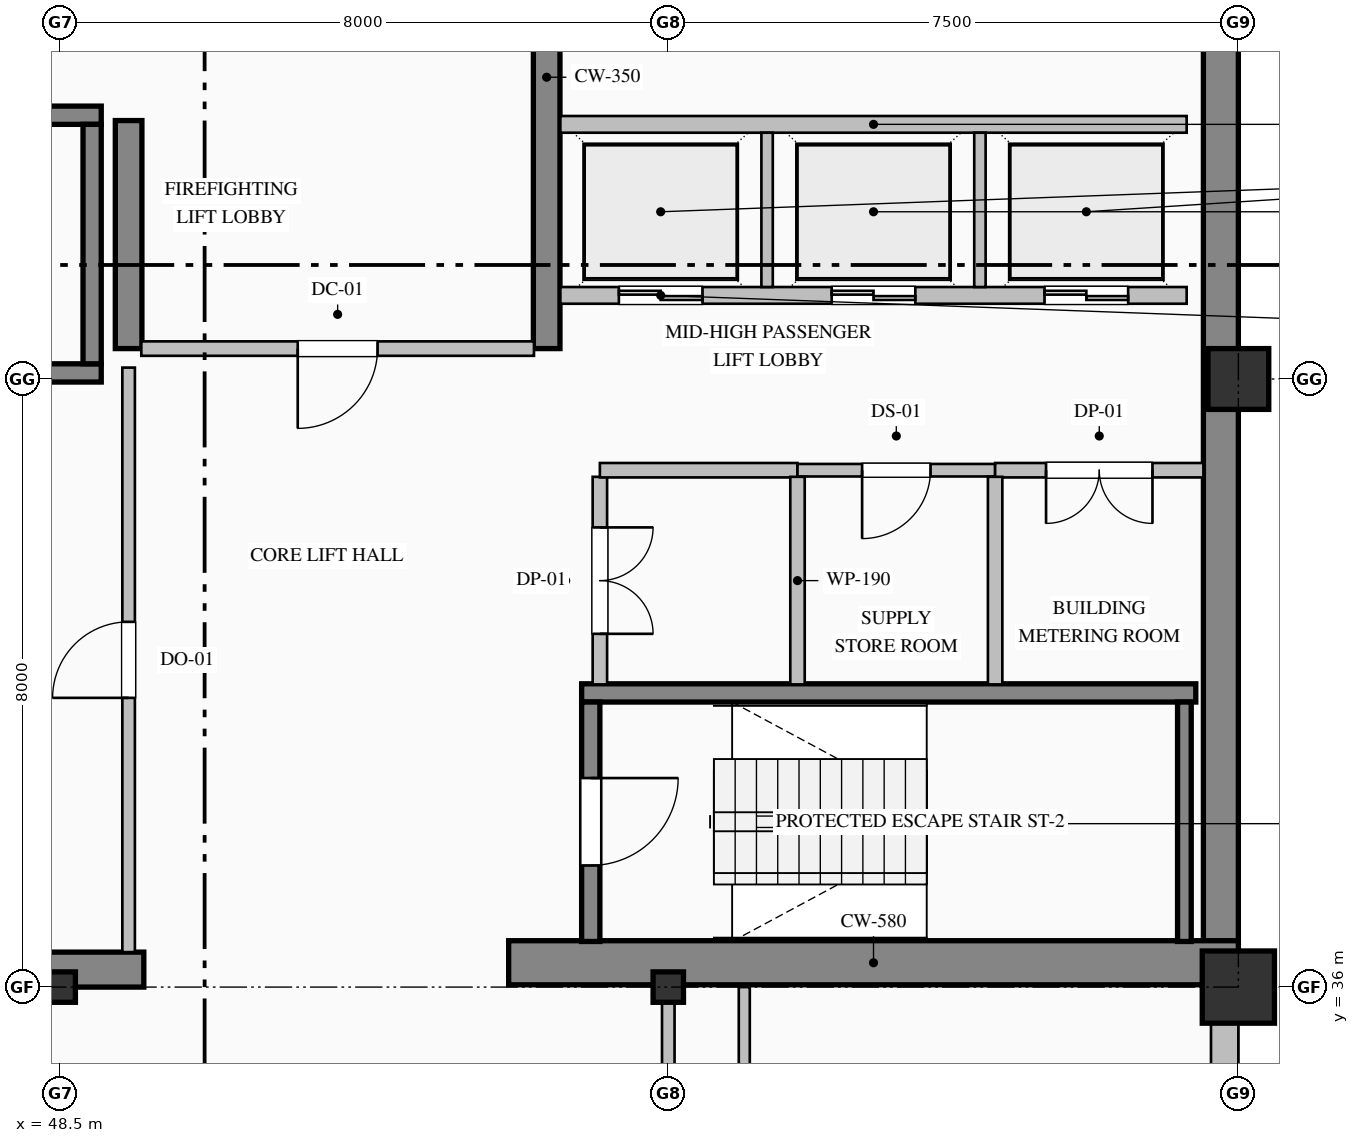
"""IFC4 building model, lengths in metres.
Left out: names, types, materials, properties, quantities, classifications, styles, units other than length and angle.
Written with IfcOpenShell. Run it as: python <this file> out.ifc"""

import sys

from ifc_helpers import new_model, si_unit, direction, frame, frame_2d, origin, origin_2d, place, context, subcontext, project, spatial, rectangle, hollow_rectangle, i_section, extrude, element, fill, save


model = new_model("IFC4")
c1 = context("Model", 3, precision=1e-05, world=origin(), true_north=direction((0.0, 1.0)))
c2 = subcontext(c1, "Body", "Model", "MODEL_VIEW")
j1 = project(units=[si_unit("LENGTHUNIT", "METRE"), si_unit("PLANEANGLEUNIT", "RADIAN")], contexts=[c1])
p1 = place(None, origin())
s1 = spatial("IfcSite", under=j1, at=p1, CompositionType="ELEMENT")
p2 = place(p1, origin())
s2 = spatial("IfcBuilding", under=s1, at=p2, CompositionType="ELEMENT")
p3 = place(p2, frame((0.0, 0.0, 241.8)))
s3 = spatial("IfcBuildingStorey", under=s2, at=p3, CompositionType="ELEMENT", Elevation=241.8)
p4 = place(p3, frame((63.77, 36.32, 0.0), z_axis=(0.0, 0.0, 1.0), x_axis=(0.0, 1.0, 0.0)))
e1 = element("IfcWall", 1, at=p4, inside=s3, PredefinedType="SHEAR", context=c2, shape_type="SweptSolid", body=[
    extrude(rectangle(XDim=15.22, YDim=0.46, at=frame_2d((7.61, 0.0))), origin(), (0.0, 0.0, 1.0), 3.775),
])
p5 = place(p3, frame((40.5, 36.23, 0.0), z_axis=(0.0, 0.0, 1.0), x_axis=(1.0, 0.0, 0.0)))
e2 = element("IfcWall", 2, at=p5, inside=s3, PredefinedType="SHEAR", context=c2, shape_type="SweptSolid", body=[
    extrude(rectangle(XDim=9.1, YDim=0.46, at=frame_2d((4.55, 0.0))), origin(), (0.0, 0.0, 1.0), 3.775),
])
p6 = place(p3, frame((54.4, 36.32, 0.0), z_axis=(0.0, 0.0, 1.0), x_axis=(1.0, 0.0, 0.0)))
e3 = element("IfcWall", 3, at=p6, inside=s3, PredefinedType="SHEAR", context=c2, shape_type="SweptSolid", body=[
    extrude(rectangle(XDim=9.6, YDim=0.58, at=frame_2d((4.8, 0.0))), origin(), (0.0, 0.0, 1.0), 4.0),
])
p7 = place(p3, frame((49.4, 44.4, 0.0), z_axis=(0.0, 0.0, 1.0), x_axis=(0.0, 1.0, 0.0)))
e4 = element("IfcWall", 4, at=p7, inside=s3, PredefinedType="SHEAR", context=c2, shape_type="SweptSolid", body=[
    extrude(rectangle(XDim=3.0, YDim=0.35, at=frame_2d((1.5, 0.0))), origin(), (0.0, 0.0, 1.0), 3.775),
])
p8 = place(p3, frame((54.9, 44.4, 0.0), z_axis=(0.0, 0.0, 1.0), x_axis=(0.0, 1.0, 0.0)))
e5 = element("IfcWall", 5, at=p8, inside=s3, PredefinedType="SHEAR", context=c2, shape_type="SweptSolid", body=[
    extrude(rectangle(XDim=7.14, YDim=0.35, at=frame_2d((3.57, 0.0))), origin(), (0.0, 0.0, 1.0), 3.775),
])
for number, where, z_axis, x_axis in (
    (6, (48.5, 36.0, 0.0), (0.0, 0.0, 1.0), (1.0, 0.0, 0.0)),
    (7, (56.5, 36.0, 0.0), (0.0, 0.0, 1.0), (1.0, 0.0, 0.0)),
):
    element("IfcColumn", number, at=place(p3, frame(where, z_axis=z_axis, x_axis=x_axis)), inside=s3, PredefinedType="COLUMN", context=c2, shape_type="SweptSolid", body=[
        extrude(i_section(OverallWidth=0.4, OverallDepth=0.4, WebThickness=0.013, FlangeThickness=0.021, FilletRadius=0.022, at=origin_2d()), origin(), (0.0, 0.0, 1.0), 4.0),
    ])
p9 = place(p3, frame((64.0, 36.0, 0.0), z_axis=(0.0, 0.0, 1.0), x_axis=(1.0, 0.0, 0.0)))
e8 = element("IfcColumn", 8, at=p9, inside=s3, PredefinedType="COLUMN", context=c2, shape_type="SweptSolid", body=[
    extrude(hollow_rectangle(XDim=0.95, YDim=0.95, WallThickness=0.036, at=origin_2d()), origin(), (0.0, 0.0, 1.0), 4.0),
])
p10 = place(p3, frame((64.0, 44.0, 0.0), z_axis=(0.0, 0.0, 1.0), x_axis=(1.0, 0.0, 0.0)))
e9 = element("IfcColumn", 9, at=p10, inside=s3, PredefinedType="COLUMN", context=c2, shape_type="SweptSolid", body=[
    extrude(hollow_rectangle(XDim=0.8, YDim=0.8, WallThickness=0.032, at=origin_2d()), origin(), (0.0, 0.0, 1.0), 4.0),
])
p11 = place(p3, frame((63.82, 36.05, 0.0), z_axis=(0.0, 0.0, 1.0), x_axis=(0.0, -1.0, 0.0)))
e10 = element("IfcWall", 10, at=p11, inside=s3, PredefinedType="SOLIDWALL", context=c2, shape_type="SweptSolid", body=[
    extrude(rectangle(XDim=19.55, YDim=0.36, at=frame_2d((9.775, 0.0))), origin(), (0.0, 0.0, 1.0), 3.325),
])
p12 = place(p11, frame((2.925, 0.0, 0.9)))
e11 = element("IfcOpeningElement", 11, at=p12, cuts=e10, PredefinedType="OPENING", context=c2, shape_type="SweptSolid", body=[
    extrude(rectangle(XDim=1.35, YDim=1.85, at=frame_2d((0.675, 0.925))), frame((0.0, 0.19, 0.0), z_axis=(0.0, -1.0, 0.0), x_axis=(1.0, 0.0, 0.0)), (0.0, 0.0, 1.0), 0.38),
])
p13 = place(p11, frame((10.2, 0.0, 0.9)))
e12 = element("IfcOpeningElement", 12, at=p13, cuts=e10, PredefinedType="OPENING", context=c2, shape_type="SweptSolid", body=[
    extrude(rectangle(XDim=1.2, YDim=1.85, at=frame_2d((0.6, 0.925))), frame((0.0, 0.19, 0.0), z_axis=(0.0, -1.0, 0.0), x_axis=(1.0, 0.0, 0.0)), (0.0, 0.0, 1.0), 0.38),
])
p14 = place(p11, frame((13.725, 0.0, 0.9)))
e13 = element("IfcOpeningElement", 13, at=p14, cuts=e10, PredefinedType="OPENING", context=c2, shape_type="SweptSolid", body=[
    extrude(rectangle(XDim=1.35, YDim=1.85, at=frame_2d((0.675, 0.925))), frame((0.0, 0.19, 0.0), z_axis=(0.0, -1.0, 0.0), x_axis=(1.0, 0.0, 0.0)), (0.0, 0.0, 1.0), 0.38),
])
for number, where, z_axis, x_axis in (
    (14, (40.96, 47.47, 0.0), (0.0, 0.0, 1.0), (1.0, 0.0, 0.0)),
    (15, (49.04, 44.08, 0.0), (0.0, 0.0, 1.0), (-1.0, 0.0, 0.0)),
):
    element("IfcWall", number, at=place(p3, frame(where, z_axis=z_axis, x_axis=x_axis)), inside=s3, PredefinedType="SOLIDWALL", context=c2, shape_type="SweptSolid", body=[
        extrude(rectangle(XDim=8.08, YDim=0.24, at=frame_2d((4.04, 0.0))), origin(), (0.0, 0.0, 1.0), 4.0),
    ])
p15 = place(p3, frame((48.92, 44.2, 0.0), z_axis=(0.0, 0.0, 1.0), x_axis=(0.0, 1.0, 0.0)))
e16 = element("IfcWall", 16, at=p15, inside=s3, PredefinedType="SOLIDWALL", context=c2, shape_type="SweptSolid", body=[
    extrude(rectangle(XDim=3.15, YDim=0.24, at=frame_2d((1.575, 0.0))), origin(), (0.0, 0.0, 1.0), 4.0),
])
p16 = place(p3, frame((55.36, 39.87, 0.0), z_axis=(0.0, 0.0, 1.0), x_axis=(1.0, 0.0, 0.0)))
e17 = element("IfcWall", 17, at=p16, inside=s3, PredefinedType="SOLIDWALL", context=c2, shape_type="SweptSolid", body=[
    extrude(rectangle(XDim=8.08, YDim=0.24, at=frame_2d((4.04, 0.0))), origin(), (0.0, 0.0, 1.0), 4.0),
])
p17 = place(p3, frame((55.48, 39.75, 0.0), z_axis=(0.0, 0.0, 1.0), x_axis=(0.0, -1.0, 0.0)))
e18 = element("IfcWall", 18, at=p17, inside=s3, PredefinedType="SOLIDWALL", context=c2, shape_type="SweptSolid", body=[
    extrude(rectangle(XDim=3.15, YDim=0.24, at=frame_2d((1.575, 0.0))), origin(), (0.0, 0.0, 1.0), 4.0),
])
p18 = place(p17, frame((1.0, 0.0, 0.0)))
e19 = element("IfcOpeningElement", 19, at=p18, cuts=e18, PredefinedType="OPENING", context=c2, shape_type="SweptSolid", body=[
    extrude(rectangle(XDim=1.15, YDim=2.2, at=frame_2d((0.575, 1.1))), frame((0.0, 0.13, 0.0), z_axis=(0.0, -1.0, 0.0), x_axis=(1.0, 0.0, 0.0)), (0.0, 0.0, 1.0), 0.26),
])
p19 = place(p3, frame((63.29, 36.6, 0.0), z_axis=(0.0, 0.0, 1.0), x_axis=(0.0, 1.0, 0.0)))
e20 = element("IfcWall", 20, at=p19, inside=s3, PredefinedType="SOLIDWALL", context=c2, shape_type="SweptSolid", body=[
    extrude(rectangle(XDim=3.15, YDim=0.18, at=frame_2d((1.575, 0.0))), origin(), (0.0, 0.0, 1.0), 4.0),
])
p20 = place(p3, frame((63.32, 45.1, 0.0), z_axis=(0.0, 0.0, 1.0), x_axis=(-1.0, 0.0, 0.0)))
e21 = element("IfcWall", 21, at=p20, inside=s3, PredefinedType="PARTITIONING", context=c2, shape_type="SweptSolid", body=[
    extrude(rectangle(XDim=8.24, YDim=0.22, at=frame_2d((4.12, 0.0))), origin(), (0.0, 0.0, 1.0), 3.775),
])
p21 = place(p20, frame((6.37, 0.0, 0.0)))
e22 = element("IfcOpeningElement", 22, at=p21, cuts=e21, PredefinedType="OPENING", context=c2, shape_type="SweptSolid", body=[
    extrude(rectangle(XDim=1.1, YDim=2.2, at=frame_2d((0.55, 1.1))), frame((0.0, 0.12, 0.0), z_axis=(0.0, -1.0, 0.0), x_axis=(1.0, 0.0, 0.0)), (0.0, 0.0, 1.0), 0.24),
])
p22 = place(p20, frame((3.57, 0.0, 0.0)))
e23 = element("IfcOpeningElement", 23, at=p22, cuts=e21, PredefinedType="OPENING", context=c2, shape_type="SweptSolid", body=[
    extrude(rectangle(XDim=1.1, YDim=2.2, at=frame_2d((0.55, 1.1))), frame((0.0, 0.12, 0.0), z_axis=(0.0, -1.0, 0.0), x_axis=(1.0, 0.0, 0.0)), (0.0, 0.0, 1.0), 0.24),
])
p23 = place(p20, frame((0.77, 0.0, 0.0)))
e24 = element("IfcOpeningElement", 24, at=p23, cuts=e21, PredefinedType="OPENING", context=c2, shape_type="SweptSolid", body=[
    extrude(rectangle(XDim=1.1, YDim=2.2, at=frame_2d((0.55, 1.1))), frame((0.0, 0.12, 0.0), z_axis=(0.0, -1.0, 0.0), x_axis=(1.0, 0.0, 0.0)), (0.0, 0.0, 1.0), 0.24),
])
p24 = place(p3, frame((55.08, 47.35, 0.0), z_axis=(0.0, 0.0, 1.0), x_axis=(1.0, 0.0, 0.0)))
e25 = element("IfcWall", 25, at=p24, inside=s3, PredefinedType="PARTITIONING", context=c2, shape_type="SweptSolid", body=[
    extrude(rectangle(XDim=8.24, YDim=0.22, at=frame_2d((4.12, 0.0))), origin(), (0.0, 0.0, 1.0), 3.775),
])
for number, where, z_axis, x_axis in (
    (26, (57.8, 45.21, 0.0), (0.0, 0.0, 1.0), (0.0, 1.0, 0.0)),
    (27, (60.6, 45.21, 0.0), (0.0, 0.0, 1.0), (0.0, 1.0, 0.0)),
):
    element("IfcWall", number, at=place(p3, frame(where, z_axis=z_axis, x_axis=x_axis)), inside=s3, PredefinedType="PARTITIONING", context=c2, shape_type="SweptSolid", body=[
        extrude(rectangle(XDim=2.03, YDim=0.15, at=frame_2d((1.015, 0.0))), origin(), (0.0, 0.0, 1.0), 3.775),
    ])
p25 = place(p3, frame((54.733, 44.4, 0.0), z_axis=(0.0, 0.0, 1.0), x_axis=(-1.0, 0.0, 0.0)))
e28 = element("IfcWall", 28, at=p25, inside=s3, PredefinedType="PARTITIONING", context=c2, shape_type="SweptSolid", body=[
    extrude(rectangle(XDim=5.166, YDim=0.19, at=frame_2d((2.583, 0.0))), origin(), (0.0, 0.0, 1.0), 3.775),
])
p26 = place(p25, frame((2.058, 0.0, 0.0)))
e29 = element("IfcOpeningElement", 29, at=p26, cuts=e28, PredefinedType="OPENING", context=c2, shape_type="SweptSolid", body=[
    extrude(rectangle(XDim=1.05, YDim=2.15, at=frame_2d((0.525, 1.075))), frame((0.0, 0.105, 0.0), z_axis=(0.0, -1.0, 0.0), x_axis=(1.0, 0.0, 0.0)), (0.0, 0.0, 1.0), 0.21),
])
p27 = place(p3, frame((49.4, 36.46, 0.0), z_axis=(0.0, 0.0, 1.0), x_axis=(0.0, 1.0, 0.0)))
e30 = element("IfcWall", 30, at=p27, inside=s3, PredefinedType="PARTITIONING", context=c2, shape_type="SweptSolid", body=[
    extrude(rectangle(XDim=7.69, YDim=0.165, at=frame_2d((3.845, 0.0))), origin(), (0.0, 0.0, 1.0), 3.017),
])
p28 = place(p27, frame((3.345, 0.0, 0.0)))
e31 = element("IfcOpeningElement", 31, at=p28, cuts=e30, PredefinedType="OPENING", context=c2, shape_type="SweptSolid", body=[
    extrude(rectangle(XDim=1.0, YDim=2.15, at=frame_2d((0.5, 1.075))), frame((0.0, 0.093, 0.0), z_axis=(0.0, -1.0, 0.0), x_axis=(1.0, 0.0, 0.0)), (0.0, 0.0, 1.0), 0.185),
])
p29 = place(p3, frame((55.6, 42.713, 0.0), z_axis=(0.0, 0.0, 1.0), x_axis=(0.0, -1.0, 0.0)))
e32 = element("IfcWall", 32, at=p29, inside=s3, PredefinedType="PARTITIONING", context=c2, shape_type="SweptSolid", body=[
    extrude(rectangle(XDim=2.731, YDim=0.19, at=frame_2d((1.365, 0.0))), origin(), (0.0, 0.0, 1.0), 3.775),
])
p30 = place(p29, frame((0.666, 0.0, 0.0)))
e33 = element("IfcOpeningElement", 33, at=p30, cuts=e32, PredefinedType="OPENING", context=c2, shape_type="SweptSolid", body=[
    extrude(rectangle(XDim=1.4, YDim=2.25, at=frame_2d((0.7, 1.125))), frame((0.0, 0.105, 0.0), z_axis=(0.0, -1.0, 0.0), x_axis=(1.0, 0.0, 0.0)), (0.0, 0.0, 1.0), 0.21),
])
p31 = place(p3, frame((58.2, 42.8, 0.0), z_axis=(0.0, 0.0, 1.0), x_axis=(-1.0, 0.0, 0.0)))
e34 = element("IfcWall", 34, at=p31, inside=s3, PredefinedType="PARTITIONING", context=c2, shape_type="SweptSolid", body=[
    extrude(rectangle(XDim=2.6, YDim=0.19, at=frame_2d((1.3, 0.0))), origin(), (0.0, 0.0, 1.0), 3.775),
])
p32 = place(p3, frame((60.8, 42.8, 0.0), z_axis=(0.0, 0.0, 1.0), x_axis=(-1.0, 0.0, 0.0)))
e35 = element("IfcWall", 35, at=p32, inside=s3, PredefinedType="PARTITIONING", context=c2, shape_type="SweptSolid", body=[
    extrude(rectangle(XDim=2.6, YDim=0.165, at=frame_2d((1.3, 0.0))), origin(), (0.0, 0.0, 1.0), 3.775),
])
p33 = place(p32, frame((0.85, 0.0, 0.0)))
e36 = element("IfcOpeningElement", 36, at=p33, cuts=e35, PredefinedType="OPENING", context=c2, shape_type="SweptSolid", body=[
    extrude(rectangle(XDim=0.9, YDim=2.15, at=frame_2d((0.45, 1.075))), frame((0.0, 0.093, 0.0), z_axis=(0.0, -1.0, 0.0), x_axis=(1.0, 0.0, 0.0)), (0.0, 0.0, 1.0), 0.185),
])
p34 = place(p3, frame((63.54, 42.8, 0.0), z_axis=(0.0, 0.0, 1.0), x_axis=(-1.0, 0.0, 0.0)))
e37 = element("IfcWall", 37, at=p34, inside=s3, PredefinedType="PARTITIONING", context=c2, shape_type="SweptSolid", body=[
    extrude(rectangle(XDim=2.74, YDim=0.19, at=frame_2d((1.37, 0.0))), origin(), (0.0, 0.0, 1.0), 3.775),
])
p35 = place(p34, frame((0.67, 0.0, 0.0)))
e38 = element("IfcOpeningElement", 38, at=p35, cuts=e37, PredefinedType="OPENING", context=c2, shape_type="SweptSolid", body=[
    extrude(rectangle(XDim=1.4, YDim=2.25, at=frame_2d((0.7, 1.125))), frame((0.0, 0.105, 0.0), z_axis=(0.0, -1.0, 0.0), x_axis=(1.0, 0.0, 0.0)), (0.0, 0.0, 1.0), 0.21),
])
for number, where, z_axis, x_axis in (
    (39, (58.2, 42.713, 0.0), (0.0, 0.0, 1.0), (0.0, -1.0, 0.0)),
    (40, (60.8, 42.713, 0.0), (0.0, 0.0, 1.0), (0.0, -1.0, 0.0)),
):
    element("IfcWall", number, at=place(p3, frame(where, z_axis=z_axis, x_axis=x_axis)), inside=s3, PredefinedType="PARTITIONING", context=c2, shape_type="SweptSolid", body=[
        extrude(rectangle(XDim=2.731, YDim=0.19, at=frame_2d((1.365, 0.0))), origin(), (0.0, 0.0, 1.0), 3.775),
    ])
p36 = place(p3, frame((56.5, 36.0, 0.0), z_axis=(0.0, 0.0, 1.0), x_axis=(0.0, -1.0, 0.0)))
e41 = element("IfcWall", 41, at=p36, inside=s3, PredefinedType="PARTITIONING", context=c2, shape_type="SweptSolid", body=[
    extrude(rectangle(XDim=5.525, YDim=0.165, at=frame_2d((2.763, 0.0))), origin(), (0.0, 0.0, 1.0), 3.179),
])
p37 = place(p3, frame((57.5, 36.0, 0.0), z_axis=(0.0, 0.0, 1.0), x_axis=(0.0, -1.0, 0.0)))
e42 = element("IfcWall", 42, at=p37, inside=s3, PredefinedType="PARTITIONING", context=c2, shape_type="SweptSolid", body=[
    extrude(rectangle(XDim=12.525, YDim=0.145, at=frame_2d((6.263, 0.0))), origin(), (0.0, 0.0, 1.0), 3.775),
])
p38 = place(p37, frame((5.763, 0.0, 0.0)))
e43 = element("IfcOpeningElement", 43, at=p38, cuts=e42, PredefinedType="OPENING", context=c2, shape_type="SweptSolid", body=[
    extrude(rectangle(XDim=1.0, YDim=2.15, at=frame_2d((0.5, 1.075))), frame((0.0, 0.083, 0.0), z_axis=(0.0, -1.0, 0.0), x_axis=(1.0, 0.0, 0.0)), (0.0, 0.0, 1.0), 0.165),
])
p39 = place(p18, origin())
e44 = element("IfcDoor", 44, at=p39, inside=s3, OperationType="SINGLE_SWING_LEFT", PredefinedType="DOOR", context=c2, shape_type="SweptSolid", body=[
    extrude(rectangle(XDim=1.15, YDim=2.2, at=frame_2d((0.575, 1.1))), frame((0.0, 0.025, 0.0), z_axis=(0.0, -1.0, 0.0), x_axis=(1.0, 0.0, 0.0)), (0.0, 0.0, 1.0), 0.05),
])
fill(e19, e44)
p40 = place(p21, origin())
e45 = element("IfcDoor", 45, at=p40, inside=s3, OperationType="DOUBLE_DOOR_SLIDING", PredefinedType="DOOR", context=c2, shape_type="SweptSolid", body=[
    extrude(rectangle(XDim=1.1, YDim=2.2, at=frame_2d((0.55, 1.1))), frame((0.0, 0.025, 0.0), z_axis=(0.0, -1.0, 0.0), x_axis=(1.0, 0.0, 0.0)), (0.0, 0.0, 1.0), 0.05),
])
fill(e22, e45)
p41 = place(p22, origin())
e46 = element("IfcDoor", 46, at=p41, inside=s3, OperationType="DOUBLE_DOOR_SLIDING", PredefinedType="DOOR", context=c2, shape_type="SweptSolid", body=[
    extrude(rectangle(XDim=1.1, YDim=2.2, at=frame_2d((0.55, 1.1))), frame((0.0, 0.025, 0.0), z_axis=(0.0, -1.0, 0.0), x_axis=(1.0, 0.0, 0.0)), (0.0, 0.0, 1.0), 0.05),
])
fill(e23, e46)
p42 = place(p23, origin())
e47 = element("IfcDoor", 47, at=p42, inside=s3, OperationType="DOUBLE_DOOR_SLIDING", PredefinedType="DOOR", context=c2, shape_type="SweptSolid", body=[
    extrude(rectangle(XDim=1.1, YDim=2.2, at=frame_2d((0.55, 1.1))), frame((0.0, 0.025, 0.0), z_axis=(0.0, -1.0, 0.0), x_axis=(1.0, 0.0, 0.0)), (0.0, 0.0, 1.0), 0.05),
])
fill(e24, e47)
p43 = place(p26, origin())
e48 = element("IfcDoor", 48, at=p43, inside=s3, OperationType="SINGLE_SWING_RIGHT", PredefinedType="DOOR", context=c2, shape_type="SweptSolid", body=[
    extrude(rectangle(XDim=1.05, YDim=2.15, at=frame_2d((0.525, 1.075))), frame((0.0, 0.025, 0.0), z_axis=(0.0, -1.0, 0.0), x_axis=(1.0, 0.0, 0.0)), (0.0, 0.0, 1.0), 0.05),
])
fill(e29, e48)
p44 = place(p28, origin())
e49 = element("IfcDoor", 49, at=p44, inside=s3, OperationType="SINGLE_SWING_LEFT", PredefinedType="DOOR", context=c2, shape_type="SweptSolid", body=[
    extrude(rectangle(XDim=1.0, YDim=2.15, at=frame_2d((0.5, 1.075))), frame((0.0, 0.025, 0.0), z_axis=(0.0, -1.0, 0.0), x_axis=(1.0, 0.0, 0.0)), (0.0, 0.0, 1.0), 0.05),
])
fill(e31, e49)
p45 = place(p30, origin())
e50 = element("IfcDoor", 50, at=p45, inside=s3, OperationType="DOUBLE_DOOR_SINGLE_SWING", PredefinedType="DOOR", context=c2, shape_type="SweptSolid", body=[
    extrude(rectangle(XDim=1.4, YDim=2.25, at=frame_2d((0.7, 1.125))), frame((0.0, 0.025, 0.0), z_axis=(0.0, -1.0, 0.0), x_axis=(1.0, 0.0, 0.0)), (0.0, 0.0, 1.0), 0.05),
])
fill(e33, e50)
p46 = place(p33, origin())
e51 = element("IfcDoor", 51, at=p46, inside=s3, OperationType="SINGLE_SWING_RIGHT", PredefinedType="DOOR", context=c2, shape_type="SweptSolid", body=[
    extrude(rectangle(XDim=0.9, YDim=2.15, at=frame_2d((0.45, 1.075))), frame((0.0, 0.025, 0.0), z_axis=(0.0, -1.0, 0.0), x_axis=(1.0, 0.0, 0.0)), (0.0, 0.0, 1.0), 0.05),
])
fill(e36, e51)
p47 = place(p35, origin())
e52 = element("IfcDoor", 52, at=p47, inside=s3, OperationType="DOUBLE_DOOR_SINGLE_SWING", PredefinedType="DOOR", context=c2, shape_type="SweptSolid", body=[
    extrude(rectangle(XDim=1.4, YDim=2.25, at=frame_2d((0.7, 1.125))), frame((0.0, 0.025, 0.0), z_axis=(0.0, -1.0, 0.0), x_axis=(1.0, 0.0, 0.0)), (0.0, 0.0, 1.0), 0.05),
])
fill(e38, e52)
save(model, sys.argv[1])
